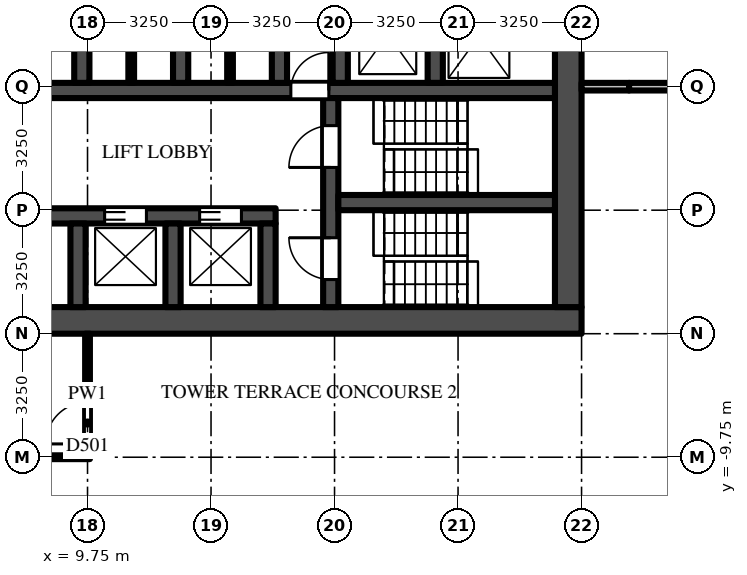
"""IFC4 building model, lengths in metres.
Left out: names, types, materials, properties, quantities, classifications, styles, units other than length and angle.
Written with IfcOpenShell. Run it as: python <this file> out.ifc"""

import sys

from ifc_helpers import new_model, si_unit, direction, frame, frame_2d, origin, place, context, subcontext, project, spatial, rectangle, extrude, source, transform, mapped, element, fill, save


model = new_model("IFC4")
c1 = context("Model", 3, precision=1e-05, world=origin(), true_north=direction((0.0, 1.0)))
c2 = subcontext(c1, "Body", "Model", "MODEL_VIEW")
j1 = project(units=[si_unit("LENGTHUNIT", "METRE"), si_unit("PLANEANGLEUNIT", "RADIAN")], contexts=[c1])
p1 = place(None, origin())
s1 = spatial("IfcSite", under=j1, at=p1, CompositionType="ELEMENT")
p2 = place(p1, origin())
s2 = spatial("IfcBuilding", under=s1, at=p2, CompositionType="ELEMENT")
p3 = place(p2, frame((0.0, 0.0, 19.0)))
s3 = spatial("IfcBuildingStorey", under=s2, at=p3, CompositionType="ELEMENT", Elevation=19.0)
m1 = source(origin(), c2, "Body", "SweptSolid", [
    extrude(rectangle(XDim=16.25, YDim=0.7, at=frame_2d((8.125, 0.0))), origin(), (0.0, 0.0, 1.0), 4.7),
])
p4 = place(p3, frame((6.5, -6.15, 0.0), z_axis=(0.0, 0.0, 1.0), x_axis=(1.0, 0.0, 0.0)))
e1 = element("IfcWall", 1, at=p4, inside=s3, PredefinedType="SHEAR", context=c2, shape_type="MappedRepresentation", body=[
    mapped(m1, transform((0.0, 0.0, 0.0))),
])
m2 = source(origin(), c2, "Body", "SweptSolid", [
    extrude(rectangle(XDim=9.05, YDim=0.7, at=frame_2d((4.525, 0.0))), origin(), (0.0, 0.0, 1.0), 4.7),
])
p5 = place(p3, frame((22.4, -5.8, 0.0), z_axis=(0.0, 0.0, 1.0), x_axis=(0.0, 1.0, 0.0)))
e2 = element("IfcWall", 2, at=p5, inside=s3, PredefinedType="SHEAR", context=c2, shape_type="MappedRepresentation", body=[
    mapped(m2, transform((0.0, 0.0, 0.0))),
])
m3 = source(origin(), c2, "Body", "SweptSolid", [
    extrude(rectangle(XDim=7.5, YDim=0.4, at=frame_2d((3.75, 0.0))), origin(), (0.0, 0.0, 1.0), 4.7),
])
p6 = place(p3, frame((7.2, -3.4, 0.0), z_axis=(0.0, 0.0, 1.0), x_axis=(1.0, 0.0, 0.0)))
e3 = element("IfcWall", 3, at=p6, inside=s3, PredefinedType="SHEAR", context=c2, shape_type="MappedRepresentation", body=[
    mapped(m3, transform((0.0, 0.0, 0.0))),
])
m4 = source(origin(), c2, "Body", "SweptSolid", [
    extrude(rectangle(XDim=1.1, YDim=2.1, at=frame_2d((0.55, 1.05))), frame((0.0, 0.21, 0.0), z_axis=(0.0, -1.0, 0.0), x_axis=(1.0, 0.0, 0.0)), (0.0, 0.0, 1.0), 0.42),
])
p7 = place(p6, frame((3.0, 0.0, 0.0)))
e4 = element("IfcOpeningElement", 4, at=p7, cuts=e3, PredefinedType="OPENING", context=c2, shape_type="MappedRepresentation", body=[
    mapped(m4, transform((0.0, 0.0, 0.0))),
])
p8 = place(p6, frame((5.5, 0.0, 0.0)))
e5 = element("IfcOpeningElement", 5, at=p8, cuts=e3, PredefinedType="OPENING", context=c2, shape_type="MappedRepresentation", body=[
    mapped(m4, transform((0.0, 0.0, 0.0))),
])
m5 = source(origin(), c2, "Body", "SweptSolid", [
    extrude(rectangle(XDim=14.85, YDim=0.4, at=frame_2d((7.425, 0.0))), origin(), (0.0, 0.0, 1.0), 4.7),
])
p9 = place(p3, frame((7.2, -0.1, 0.0), z_axis=(0.0, 0.0, 1.0), x_axis=(1.0, 0.0, 0.0)))
e6 = element("IfcWall", 6, at=p9, inside=s3, PredefinedType="SHEAR", context=c2, shape_type="MappedRepresentation", body=[
    mapped(m5, transform((0.0, 0.0, 0.0))),
])
m6 = source(origin(), c2, "Body", "SweptSolid", [
    extrude(rectangle(XDim=1.0, YDim=2.1, at=frame_2d((0.5, 1.05))), frame((0.0, 0.21, 0.0), z_axis=(0.0, -1.0, 0.0), x_axis=(1.0, 0.0, 0.0)), (0.0, 0.0, 1.0), 0.42),
])
p10 = place(p9, frame((7.9, 0.0, 0.0)))
e7 = element("IfcOpeningElement", 7, at=p10, cuts=e6, PredefinedType="OPENING", context=c2, shape_type="MappedRepresentation", body=[
    mapped(m6, transform((0.0, 0.0, 0.0))),
])
m7 = source(origin(), c2, "Body", "SweptSolid", [
    extrude(rectangle(XDim=5.5, YDim=0.4, at=frame_2d((2.75, 0.0))), origin(), (0.0, 0.0, 1.0), 4.7),
])
p11 = place(p3, frame((16.15, -5.8, 0.0), z_axis=(0.0, 0.0, 1.0), x_axis=(0.0, 1.0, 0.0)))
e8 = element("IfcWall", 8, at=p11, inside=s3, PredefinedType="SHEAR", context=c2, shape_type="MappedRepresentation", body=[
    mapped(m7, transform((0.0, 0.0, 0.0))),
])
p12 = place(p11, frame((0.725, 0.0, 0.0)))
e9 = element("IfcOpeningElement", 9, at=p12, cuts=e8, PredefinedType="OPENING", context=c2, shape_type="MappedRepresentation", body=[
    mapped(m4, transform((0.0, 0.0, 0.0))),
])
p13 = place(p11, frame((3.675, 0.0, 0.0)))
e10 = element("IfcOpeningElement", 10, at=p13, cuts=e8, PredefinedType="OPENING", context=c2, shape_type="MappedRepresentation", body=[
    mapped(m4, transform((0.0, 0.0, 0.0))),
])
m8 = source(origin(), c2, "Body", "SweptSolid", [
    extrude(rectangle(XDim=5.7, YDim=0.4, at=frame_2d((2.85, 0.0))), origin(), (0.0, 0.0, 1.0), 4.7),
])
p14 = place(p3, frame((16.35, -3.05, 0.0), z_axis=(0.0, 0.0, 1.0), x_axis=(1.0, 0.0, 0.0)))
e11 = element("IfcWall", 11, at=p14, inside=s3, PredefinedType="SHEAR", context=c2, shape_type="MappedRepresentation", body=[
    mapped(m8, transform((0.0, 0.0, 0.0))),
])
m9 = source(origin(), c2, "Body", "SweptSolid", [
    extrude(rectangle(XDim=2.2, YDim=0.4, at=frame_2d((1.1, 0.0))), origin(), (0.0, 0.0, 1.0), 4.7),
])
for number, where, z_axis, x_axis in (
    (12, (9.5, -5.8, 0.0), (0.0, 0.0, 1.0), (0.0, 1.0, 0.0)),
    (13, (12.0, -5.8, 0.0), (0.0, 0.0, 1.0), (0.0, 1.0, 0.0)),
    (14, (14.5, -5.8, 0.0), (0.0, 0.0, 1.0), (0.0, 1.0, 0.0)),
):
    element("IfcWall", number, at=place(p3, frame(where, z_axis=z_axis, x_axis=x_axis)), inside=s3, PredefinedType="SHEAR", context=c2, shape_type="MappedRepresentation", body=[
        mapped(m9, transform((0.0, 0.0, 0.0))),
    ])
m10 = source(origin(), c2, "Body", "SweptSolid", [
    extrude(rectangle(XDim=2.45, YDim=0.4, at=frame_2d((1.225, 0.0))), origin(), (0.0, 0.0, 1.0), 4.7),
])
for number, where, z_axis, x_axis in (
    (15, (9.6, 0.1, 0.0), (0.0, 0.0, 1.0), (0.0, 1.0, 0.0)),
    (16, (12.2, 0.1, 0.0), (0.0, 0.0, 1.0), (0.0, 1.0, 0.0)),
    (17, (14.8, 0.1, 0.0), (0.0, 0.0, 1.0), (0.0, 1.0, 0.0)),
    (18, (16.4, 0.1, 0.0), (0.0, 0.0, 1.0), (0.0, 1.0, 0.0)),
    (19, (18.9, 0.1, 0.0), (0.0, 0.0, 1.0), (0.0, 1.0, 0.0)),
):
    element("IfcWall", number, at=place(p3, frame(where, z_axis=z_axis, x_axis=x_axis)), inside=s3, PredefinedType="SHEAR", context=c2, shape_type="MappedRepresentation", body=[
        mapped(m10, transform((0.0, 0.0, 0.0))),
    ])
m11 = source(origin(), c2, "Body", "SweptSolid", [
    extrude(rectangle(XDim=2.45, YDim=0.15, at=frame_2d((1.225, 0.0))), origin(), (0.0, 0.0, 1.0), 4.7),
])
for number, where, z_axis, x_axis in (
    (20, (10.9, 0.1, 0.0), (0.0, 0.0, 1.0), (0.0, 1.0, 0.0)),
    (21, (13.5, 0.1, 0.0), (0.0, 0.0, 1.0), (0.0, 1.0, 0.0)),
):
    element("IfcWall", number, at=place(p3, frame(where, z_axis=z_axis, x_axis=x_axis)), inside=s3, PredefinedType="PARTITIONING", context=c2, shape_type="MappedRepresentation", body=[
        mapped(m11, transform((0.0, 0.0, 0.0))),
    ])
m12 = source(origin(), c2, "Body", "SweptSolid", [
    extrude(rectangle(XDim=3.2, YDim=0.125, at=frame_2d((1.6, 0.0))), origin(), (0.0, 0.0, 1.0), 3.996),
])
p15 = place(p3, frame((9.75, -9.7, 0.0), z_axis=(0.0, 0.0, 1.0), x_axis=(0.0, 1.0, 0.0)))
e22 = element("IfcWall", 22, at=p15, inside=s3, PredefinedType="PARTITIONING", context=c2, shape_type="MappedRepresentation", body=[
    mapped(m12, transform((0.0, 0.0, 0.0))),
])
m13 = source(origin(), c2, "Body", "SweptSolid", [
    extrude(rectangle(XDim=1.1, YDim=2.1, at=frame_2d((0.55, 1.05))), frame((0.0, 0.073, 0.0), z_axis=(0.0, -1.0, 0.0), x_axis=(1.0, 0.0, 0.0)), (0.0, 0.0, 1.0), 0.145),
])
p16 = place(p15, frame((0.3, 0.0, 0.0)))
e23 = element("IfcOpeningElement", 23, at=p16, cuts=e22, PredefinedType="OPENING", context=c2, shape_type="MappedRepresentation", body=[
    mapped(m13, transform((0.0, 0.0, 0.0))),
])
m14 = source(origin(), c2, "Body", "SweptSolid", [
    extrude(rectangle(XDim=9.875, YDim=0.1, at=frame_2d((4.938, 0.0))), origin(), (0.0, 0.0, 1.0), 3.762),
])
p17 = place(p3, frame((-0.062, -9.75, 0.0), z_axis=(0.0, 0.0, 1.0), x_axis=(1.0, 0.0, 0.0)))
e24 = element("IfcWall", 24, at=p17, inside=s3, PredefinedType="PARTITIONING", context=c2, shape_type="MappedRepresentation", body=[
    mapped(m14, transform((0.0, 0.0, 0.0))),
])
m15 = source(origin(), c2, "Body", "SweptSolid", [
    extrude(rectangle(XDim=1.25, YDim=0.2, at=frame_2d((0.625, 0.0))), origin(), (0.0, 0.0, 1.0), 4.077),
])
p18 = place(p3, frame((22.75, 0.0, 0.0), z_axis=(0.0, 0.0, 1.0), x_axis=(1.0, 0.0, 0.0)))
e25 = element("IfcWall", 25, at=p18, inside=s3, PredefinedType="PARTITIONING", context=c2, shape_type="MappedRepresentation", body=[
    mapped(m15, transform((0.0, 0.0, 0.0))),
])
m16 = source(origin(), c2, "Body", "SweptSolid", [
    extrude(rectangle(XDim=2.0, YDim=0.2, at=frame_2d((1.0, 0.0))), origin(), (0.0, 0.0, 1.0), 4.077),
])
p19 = place(p3, frame((26.0, 0.0, 0.0), z_axis=(0.0, 0.0, 1.0), x_axis=(-1.0, 0.0, 0.0)))
e26 = element("IfcWall", 26, at=p19, inside=s3, PredefinedType="PARTITIONING", context=c2, shape_type="MappedRepresentation", body=[
    mapped(m16, transform((0.0, 0.0, 0.0))),
])
m17 = source(origin(), c2, "Body", "SweptSolid", [
    extrude(rectangle(XDim=1.1, YDim=2.1, at=frame_2d((0.55, 1.05))), frame((0.0, 0.025, 0.0), z_axis=(0.0, -1.0, 0.0), x_axis=(1.0, 0.0, 0.0)), (0.0, 0.0, 1.0), 0.05),
])
p20 = place(p7, origin())
e27 = element("IfcDoor", 27, at=p20, inside=s3, OperationType="DOUBLE_DOOR_SLIDING", PredefinedType="DOOR", context=c2, shape_type="MappedRepresentation", body=[
    mapped(m17, transform((0.0, 0.0, 0.0))),
])
fill(e4, e27)
p21 = place(p8, origin())
e28 = element("IfcDoor", 28, at=p21, inside=s3, OperationType="DOUBLE_DOOR_SLIDING", PredefinedType="DOOR", context=c2, shape_type="MappedRepresentation", body=[
    mapped(m17, transform((0.0, 0.0, 0.0))),
])
fill(e5, e28)
p22 = place(p12, origin())
e29 = element("IfcDoor", 29, at=p22, inside=s3, OperationType="SINGLE_SWING_RIGHT", PredefinedType="DOOR", context=c2, shape_type="MappedRepresentation", body=[
    mapped(m17, transform((0.0, 0.0, 0.0))),
])
fill(e9, e29)
p23 = place(p13, origin())
e30 = element("IfcDoor", 30, at=p23, inside=s3, OperationType="SINGLE_SWING_LEFT", PredefinedType="DOOR", context=c2, shape_type="MappedRepresentation", body=[
    mapped(m17, transform((0.0, 0.0, 0.0))),
])
fill(e10, e30)
m18 = source(origin(), c2, "Body", "SweptSolid", [
    extrude(rectangle(XDim=1.0, YDim=2.1, at=frame_2d((0.5, 1.05))), frame((0.0, 0.025, 0.0), z_axis=(0.0, -1.0, 0.0), x_axis=(1.0, 0.0, 0.0)), (0.0, 0.0, 1.0), 0.05),
])
p24 = place(p10, origin())
e31 = element("IfcDoor", 31, at=p24, inside=s3, OperationType="SINGLE_SWING_RIGHT", PredefinedType="DOOR", context=c2, shape_type="MappedRepresentation", body=[
    mapped(m18, transform((0.0, 0.0, 0.0))),
])
fill(e7, e31)
p25 = place(p16, origin())
e32 = element("IfcDoor", 32, at=p25, inside=s3, OperationType="SINGLE_SWING_LEFT", PredefinedType="DOOR", context=c2, shape_type="MappedRepresentation", body=[
    mapped(m17, transform((0.0, 0.0, 0.0))),
])
fill(e23, e32)
save(model, sys.argv[1])
